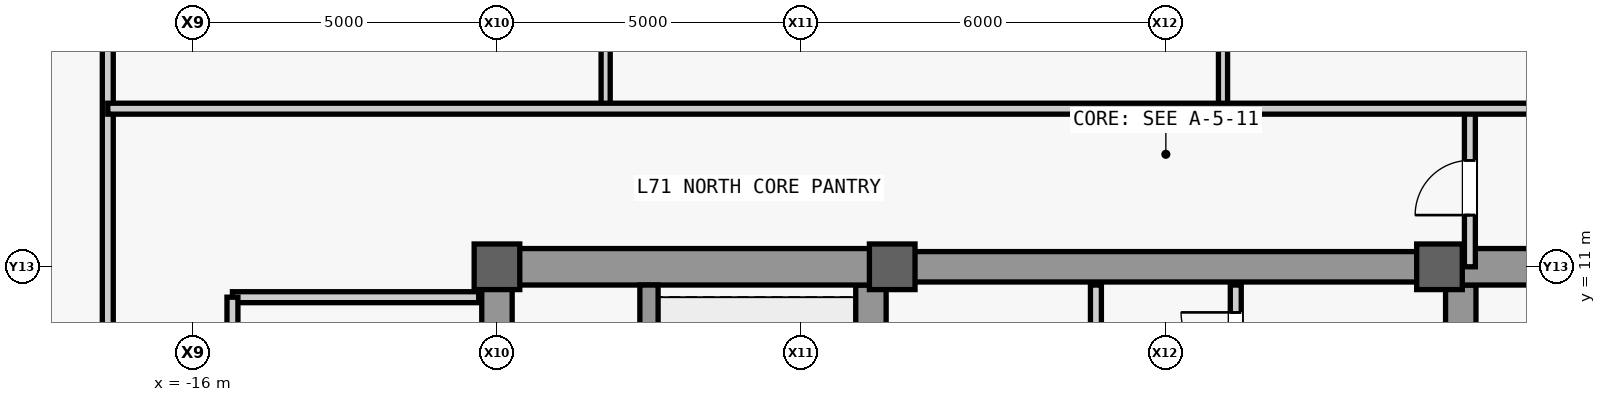
"""IFC4 building model, lengths in metres.
Left out: names, types, materials, properties, quantities, classifications, styles, units other than length and angle.
Written with IfcOpenShell. Run it as: python <this file> out.ifc"""

import sys

from ifc_helpers import new_model, si_unit, direction, frame, frame_2d, origin, origin_2d, place, context, subcontext, project, spatial, rectangle, extrude, source, transform, mapped, element, fill, save


model = new_model("IFC4")
c1 = context("Model", 3, precision=1e-05, world=origin(), true_north=direction((0.0, 1.0)))
c2 = subcontext(c1, "Body", "Model", "MODEL_VIEW")
j1 = project(units=[si_unit("LENGTHUNIT", "METRE"), si_unit("PLANEANGLEUNIT", "RADIAN")], contexts=[c1])
p1 = place(None, origin())
s1 = spatial("IfcSite", under=j1, at=p1, CompositionType="ELEMENT")
p2 = place(p1, origin())
s2 = spatial("IfcBuilding", under=s1, at=p2, CompositionType="ELEMENT")
p3 = place(p2, frame((0.0, 0.0, 301.5)))
s3 = spatial("IfcBuildingStorey", under=s2, at=p3, CompositionType="ELEMENT", Elevation=301.5)
m1 = source(origin(), c2, "Body", "SweptSolid", [
    extrude(rectangle(XDim=22.0, YDim=0.5, at=frame_2d((11.0, 0.0))), origin(), (0.0, 0.0, 1.0), 3.78),
])
p4 = place(p3, frame((-11.0, -11.0, 0.0), z_axis=(0.0, 0.0, 1.0), x_axis=(0.0, 1.0, 0.0)))
e1 = element("IfcWall", 1, at=p4, inside=s3, PredefinedType="SHEAR", context=c2, shape_type="MappedRepresentation", body=[
    mapped(m1, transform((0.0, 0.0, 0.0), scale=1.0)),
])
m2 = source(origin(), c2, "Body", "SweptSolid", [
    extrude(rectangle(XDim=1.1, YDim=2.2, at=frame_2d((0.55, 1.1))), frame((0.0, 0.26, 0.0), z_axis=(0.0, -1.0, 0.0), x_axis=(1.0, 0.0, 0.0)), (0.0, 0.0, 1.0), 0.52),
])
p5 = place(p4, frame((0.8, 0.0, 0.0)))
e2 = element("IfcOpeningElement", 2, at=p5, cuts=e1, PredefinedType="OPENING", context=c2, shape_type="MappedRepresentation", body=[
    mapped(m2, transform((0.0, 0.0, 0.0), scale=1.0)),
])
p6 = place(p4, frame((12.5, 0.0, 0.0)))
e3 = element("IfcOpeningElement", 3, at=p6, cuts=e1, PredefinedType="OPENING", context=c2, shape_type="MappedRepresentation", body=[
    mapped(m2, transform((0.0, 0.0, 0.0), scale=1.0)),
])
m3 = source(origin(), c2, "Body", "SweptSolid", [
    extrude(rectangle(XDim=0.9, YDim=2.15, at=frame_2d((0.45, 1.075))), frame((0.0, 0.26, 0.0), z_axis=(0.0, -1.0, 0.0), x_axis=(1.0, 0.0, 0.0)), (0.0, 0.0, 1.0), 0.52),
])
p7 = place(p4, frame((6.85, 0.0, 0.0)))
e4 = element("IfcOpeningElement", 4, at=p7, cuts=e1, PredefinedType="OPENING", context=c2, shape_type="MappedRepresentation", body=[
    mapped(m3, transform((0.0, 0.0, 0.0), scale=1.0)),
])
m4 = source(origin(), c2, "Body", "SweptSolid", [
    extrude(rectangle(XDim=1.2, YDim=2.3, at=frame_2d((0.6, 1.15))), frame((0.0, 0.26, 0.0), z_axis=(0.0, -1.0, 0.0), x_axis=(1.0, 0.0, 0.0)), (0.0, 0.0, 1.0), 0.52),
])
p8 = place(p4, frame((14.6, 0.0, 0.0)))
e5 = element("IfcOpeningElement", 5, at=p8, cuts=e1, PredefinedType="OPENING", context=c2, shape_type="MappedRepresentation", body=[
    mapped(m4, transform((0.0, 0.0, 0.0), scale=1.0)),
])
p9 = place(p4, frame((18.2, 0.0, 0.0)))
e6 = element("IfcOpeningElement", 6, at=p9, cuts=e1, PredefinedType="OPENING", context=c2, shape_type="MappedRepresentation", body=[
    mapped(m4, transform((0.0, 0.0, 0.0), scale=1.0)),
])
m5 = source(origin(), c2, "Body", "SweptSolid", [
    extrude(rectangle(XDim=1.3, YDim=2.3, at=frame_2d((0.65, 1.15))), frame((0.0, 0.26, 0.0), z_axis=(0.0, -1.0, 0.0), x_axis=(1.0, 0.0, 0.0)), (0.0, 0.0, 1.0), 0.52),
])
p10 = place(p4, frame((2.7, 0.0, 0.0)))
e7 = element("IfcOpeningElement", 7, at=p10, cuts=e1, PredefinedType="OPENING", context=c2, shape_type="MappedRepresentation", body=[
    mapped(m5, transform((0.0, 0.0, 0.0), scale=1.0)),
])
m6 = source(origin(), c2, "Body", "SweptSolid", [
    extrude(rectangle(XDim=21.4, YDim=0.5, at=frame_2d((10.7, 0.0))), origin(), (0.0, 0.0, 1.0), 3.78),
])
for number, where, z_axis, x_axis in (
    (8, (-4.85, -10.7, 0.0), (0.0, 0.0, 1.0), (0.0, 1.0, 0.0)),
    (9, (4.85, -10.7, 0.0), (0.0, 0.0, 1.0), (0.0, 1.0, 0.0)),
):
    element("IfcWall", number, at=place(p3, frame(where, z_axis=z_axis, x_axis=x_axis)), inside=s3, PredefinedType="SHEAR", context=c2, shape_type="MappedRepresentation", body=[
        mapped(m6, transform((0.0, 0.0, 0.0), scale=1.0)),
    ])
m7 = source(origin(), c2, "Body", "SweptSolid", [
    extrude(rectangle(XDim=5.9, YDim=0.6, at=frame_2d((2.95, 0.0))), origin(), (0.0, 0.0, 1.0), 3.78),
])
p11 = place(p3, frame((-10.75, 11.0, 0.0), z_axis=(0.0, 0.0, 1.0), x_axis=(1.0, 0.0, 0.0)))
e10 = element("IfcWall", 10, at=p11, inside=s3, PredefinedType="SHEAR", context=c2, shape_type="MappedRepresentation", body=[
    mapped(m7, transform((0.0, 0.0, 0.0), scale=1.0)),
])
p12 = place(p3, frame((4.85, 11.0, 0.0), z_axis=(0.0, 0.0, 1.0), x_axis=(1.0, 0.0, 0.0)))
e11 = element("IfcWall", 11, at=p12, inside=s3, PredefinedType="SHEAR", context=c2, shape_type="MappedRepresentation", body=[
    mapped(m7, transform((0.0, 0.0, 0.0), scale=1.0)),
])
m8 = source(origin(), c2, "Body", "SweptSolid", [
    extrude(rectangle(XDim=1.05, YDim=2.2, at=frame_2d((0.525, 1.1))), frame((0.0, 0.31, 0.0), z_axis=(0.0, -1.0, 0.0), x_axis=(1.0, 0.0, 0.0)), (0.0, 0.0, 1.0), 0.62),
])
p13 = place(p12, frame((1.375, 0.0, 0.0)))
e12 = element("IfcOpeningElement", 12, at=p13, cuts=e11, PredefinedType="OPENING", context=c2, shape_type="MappedRepresentation", body=[
    mapped(m8, transform((0.0, 0.0, 0.0), scale=1.0)),
])
m9 = source(origin(), c2, "Body", "SweptSolid", [
    extrude(rectangle(XDim=9.2, YDim=0.5, at=frame_2d((4.6, 0.0))), origin(), (0.0, 0.0, 1.0), 3.78),
])
p14 = place(p3, frame((-4.6, 11.0, 0.0), z_axis=(0.0, 0.0, 1.0), x_axis=(1.0, 0.0, 0.0)))
e13 = element("IfcWall", 13, at=p14, inside=s3, PredefinedType="SHEAR", context=c2, shape_type="MappedRepresentation", body=[
    mapped(m9, transform((0.0, 0.0, 0.0), scale=1.0)),
])
m10 = source(origin(), c2, "Body", "SweptSolid", [
    extrude(rectangle(XDim=0.75, YDim=0.75, at=origin_2d()), origin(), (0.0, 0.0, 1.0), 4.0),
])
for number, where, z_axis, x_axis in (
    (14, (-11.0, 11.0, 0.0), (0.0, 0.0, 1.0), (1.0, 0.0, 0.0)),
    (15, (-4.5, 11.0, 0.0), (0.0, 0.0, 1.0), (1.0, 0.0, 0.0)),
    (16, (4.5, 11.0, 0.0), (0.0, 0.0, 1.0), (1.0, 0.0, 0.0)),
):
    element("IfcColumn", number, at=place(p3, frame(where, z_axis=z_axis, x_axis=x_axis)), inside=s3, PredefinedType="COLUMN", context=c2, shape_type="MappedRepresentation", body=[
        mapped(m10, transform((0.0, 0.0, 0.0), scale=1.0)),
    ])
m11 = source(origin(), c2, "Body", "SweptSolid", [
    extrude(rectangle(XDim=7.75, YDim=0.3, at=frame_2d((3.875, 0.0))), origin(), (0.0, 0.0, 1.0), 3.78),
])
p15 = place(p3, frame((-8.5, 2.95, 0.0), z_axis=(0.0, 0.0, 1.0), x_axis=(0.0, 1.0, 0.0)))
e17 = element("IfcWall", 17, at=p15, inside=s3, PredefinedType="SHEAR", context=c2, shape_type="MappedRepresentation", body=[
    mapped(m11, transform((0.0, 0.0, 0.0), scale=1.0)),
])
m12 = source(origin(), c2, "Body", "SweptSolid", [
    extrude(rectangle(XDim=4.05, YDim=0.18, at=frame_2d((2.025, 0.0))), origin(), (0.0, 0.0, 1.0), 3.78),
])
p16 = place(p3, frame((-15.35, 10.5, 0.0), z_axis=(0.0, 0.0, 1.0), x_axis=(1.0, 0.0, 0.0)))
e18 = element("IfcWall", 18, at=p16, inside=s3, PredefinedType="PARTITIONING", context=c2, shape_type="MappedRepresentation", body=[
    mapped(m12, transform((0.0, 0.0, 0.0), scale=1.0)),
])
m13 = source(origin(), c2, "Body", "SweptSolid", [
    extrude(rectangle(XDim=16.6, YDim=0.18, at=frame_2d((8.3, 0.0))), origin(), (0.0, 0.0, 1.0), 3.78),
])
p17 = place(p3, frame((-15.35, -6.1, 0.0), z_axis=(0.0, 0.0, 1.0), x_axis=(0.0, 1.0, 0.0)))
e19 = element("IfcWall", 19, at=p17, inside=s3, PredefinedType="PARTITIONING", context=c2, shape_type="MappedRepresentation", body=[
    mapped(m13, transform((0.0, 0.0, 0.0), scale=1.0)),
])
m14 = source(origin(), c2, "Body", "SweptSolid", [
    extrude(rectangle(XDim=1.8, YDim=2.25, at=frame_2d((0.9, 1.125))), frame((0.0, 0.1, 0.0), z_axis=(0.0, -1.0, 0.0), x_axis=(1.0, 0.0, 0.0)), (0.0, 0.0, 1.0), 0.2),
])
p18 = place(p17, frame((2.7, 0.0, 0.0)))
e20 = element("IfcOpeningElement", 20, at=p18, cuts=e19, PredefinedType="OPENING", context=c2, shape_type="MappedRepresentation", body=[
    mapped(m14, transform((0.0, 0.0, 0.0), scale=1.0)),
])
p19 = place(p17, frame((11.0, 0.0, 0.0)))
e21 = element("IfcOpeningElement", 21, at=p19, cuts=e19, PredefinedType="OPENING", context=c2, shape_type="MappedRepresentation", body=[
    mapped(m14, transform((0.0, 0.0, 0.0), scale=1.0)),
])
m15 = source(origin(), c2, "Body", "SweptSolid", [
    extrude(rectangle(XDim=5.4, YDim=0.18, at=frame_2d((2.7, 0.0))), origin(), (0.0, 0.0, 1.0), 3.78),
])
p20 = place(p3, frame((-1.15, 5.3, 0.0), z_axis=(0.0, 0.0, 1.0), x_axis=(0.0, 1.0, 0.0)))
e22 = element("IfcWall", 22, at=p20, inside=s3, PredefinedType="PARTITIONING", context=c2, shape_type="MappedRepresentation", body=[
    mapped(m15, transform((0.0, 0.0, 0.0), scale=1.0)),
])
m16 = source(origin(), c2, "Body", "SweptSolid", [
    extrude(rectangle(XDim=0.9, YDim=2.15, at=frame_2d((0.45, 1.075))), frame((0.0, 0.1, 0.0), z_axis=(0.0, -1.0, 0.0), x_axis=(1.0, 0.0, 0.0)), (0.0, 0.0, 1.0), 0.2),
])
p21 = place(p20, frame((2.25, 0.0, 0.0)))
e23 = element("IfcOpeningElement", 23, at=p21, cuts=e22, PredefinedType="OPENING", context=c2, shape_type="MappedRepresentation", body=[
    mapped(m16, transform((0.0, 0.0, 0.0), scale=1.0)),
])
p22 = place(p3, frame((1.15, 5.3, 0.0), z_axis=(0.0, 0.0, 1.0), x_axis=(0.0, 1.0, 0.0)))
e24 = element("IfcWall", 24, at=p22, inside=s3, PredefinedType="PARTITIONING", context=c2, shape_type="MappedRepresentation", body=[
    mapped(m15, transform((0.0, 0.0, 0.0), scale=1.0)),
])
p23 = place(p22, frame((0.45, 0.0, 0.0)))
e25 = element("IfcOpeningElement", 25, at=p23, cuts=e24, PredefinedType="OPENING", context=c2, shape_type="MappedRepresentation", body=[
    mapped(m16, transform((0.0, 0.0, 0.0), scale=1.0)),
])
p24 = place(p22, frame((2.25, 0.0, 0.0)))
e26 = element("IfcOpeningElement", 26, at=p24, cuts=e24, PredefinedType="OPENING", context=c2, shape_type="MappedRepresentation", body=[
    mapped(m16, transform((0.0, 0.0, 0.0), scale=1.0)),
])
p25 = place(p22, frame((4.05, 0.0, 0.0)))
e27 = element("IfcOpeningElement", 27, at=p25, cuts=e24, PredefinedType="OPENING", context=c2, shape_type="MappedRepresentation", body=[
    mapped(m16, transform((0.0, 0.0, 0.0), scale=1.0)),
])
m17 = source(origin(), c2, "Body", "SweptSolid", [
    extrude(rectangle(XDim=8.4, YDim=0.18, at=frame_2d((4.2, 0.0))), origin(), (0.0, 0.0, 1.0), 3.78),
])
p26 = place(p3, frame((-17.4, 7.2, 0.0), z_axis=(0.0, 0.0, 1.0), x_axis=(0.0, 1.0, 0.0)))
e28 = element("IfcWall", 28, at=p26, inside=s3, PredefinedType="PARTITIONING", context=c2, shape_type="MappedRepresentation", body=[
    mapped(m17, transform((0.0, 0.0, 0.0), scale=1.0)),
])
m18 = source(origin(), c2, "Body", "SweptSolid", [
    extrude(rectangle(XDim=2.6, YDim=0.18, at=frame_2d((1.3, 0.0))), origin(), (0.0, 0.0, 1.0), 3.78),
])
p27 = place(p3, frame((5.0, 11.0, 0.0), z_axis=(0.0, 0.0, 1.0), x_axis=(0.0, 1.0, 0.0)))
e29 = element("IfcWall", 29, at=p27, inside=s3, PredefinedType="PARTITIONING", context=c2, shape_type="MappedRepresentation", body=[
    mapped(m18, transform((0.0, 0.0, 0.0), scale=1.0)),
])
p28 = place(p27, frame((0.85, 0.0, 0.0)))
e30 = element("IfcOpeningElement", 30, at=p28, cuts=e29, PredefinedType="OPENING", context=c2, shape_type="MappedRepresentation", body=[
    mapped(m16, transform((0.0, 0.0, 0.0), scale=1.0)),
])
m19 = source(origin(), c2, "Body", "SweptSolid", [
    extrude(rectangle(XDim=14.4, YDim=0.15, at=frame_2d((7.2, 0.0))), origin(), (0.0, 0.0, 1.0), 3.78),
])
p29 = place(p3, frame((-9.212, 13.6, 0.0), z_axis=(0.0, 0.0, 1.0), x_axis=(0.0, 1.0, 0.0)))
e31 = element("IfcWall", 31, at=p29, inside=s3, PredefinedType="PARTITIONING", context=c2, shape_type="MappedRepresentation", body=[
    mapped(m19, transform((0.0, 0.0, 0.0), scale=1.0)),
])
m20 = source(origin(), c2, "Body", "SweptSolid", [
    extrude(rectangle(XDim=0.95, YDim=2.15, at=frame_2d((0.475, 1.075))), frame((0.0, 0.085, 0.0), z_axis=(0.0, -1.0, 0.0), x_axis=(1.0, 0.0, 0.0)), (0.0, 0.0, 1.0), 0.17),
])
p30 = place(p29, frame((2.981, 0.0, 0.0)))
e32 = element("IfcOpeningElement", 32, at=p30, cuts=e31, PredefinedType="OPENING", context=c2, shape_type="MappedRepresentation", body=[
    mapped(m20, transform((0.0, 0.0, 0.0), scale=1.0)),
])
p31 = place(p3, frame((0.94, 13.6, 0.0), z_axis=(0.0, 0.0, 1.0), x_axis=(0.0, 1.0, 0.0)))
e33 = element("IfcWall", 33, at=p31, inside=s3, PredefinedType="PARTITIONING", context=c2, shape_type="MappedRepresentation", body=[
    mapped(m19, transform((0.0, 0.0, 0.0), scale=1.0)),
])
p32 = place(p31, frame((2.981, 0.0, 0.0)))
e34 = element("IfcOpeningElement", 34, at=p32, cuts=e33, PredefinedType="OPENING", context=c2, shape_type="MappedRepresentation", body=[
    mapped(m20, transform((0.0, 0.0, 0.0), scale=1.0)),
])
m21 = source(origin(), c2, "Body", "SweptSolid", [
    extrude(rectangle(XDim=32.75, YDim=0.18, at=frame_2d((16.375, 0.0))), origin(), (0.0, 0.0, 1.0), 3.78),
])
p33 = place(p3, frame((-17.4, 13.6, 0.0), z_axis=(0.0, 0.0, 1.0), x_axis=(1.0, 0.0, 0.0)))
e35 = element("IfcWall", 35, at=p33, inside=s3, PredefinedType="PARTITIONING", context=c2, shape_type="MappedRepresentation", body=[
    mapped(m21, transform((0.0, 0.0, 0.0), scale=1.0)),
])
m22 = source(origin(), c2, "Body", "SweptSolid", [
    extrude(rectangle(XDim=1.05, YDim=2.2, at=frame_2d((0.525, 1.1))), frame((0.0, 0.1, 0.0), z_axis=(0.0, -1.0, 0.0), x_axis=(1.0, 0.0, 0.0)), (0.0, 0.0, 1.0), 0.2),
])
p34 = place(p33, frame((24.603, 0.0, 0.0)))
e36 = element("IfcOpeningElement", 36, at=p34, cuts=e35, PredefinedType="OPENING", context=c2, shape_type="MappedRepresentation", body=[
    mapped(m22, transform((0.0, 0.0, 0.0), scale=1.0)),
])
p35 = place(p33, frame((28.802, 0.0, 0.0)))
e37 = element("IfcOpeningElement", 37, at=p35, cuts=e35, PredefinedType="OPENING", context=c2, shape_type="MappedRepresentation", body=[
    mapped(m22, transform((0.0, 0.0, 0.0), scale=1.0)),
])
m23 = source(origin(), c2, "Body", "SweptSolid", [
    extrude(rectangle(XDim=0.9, YDim=2.15, at=frame_2d((0.45, 1.075))), frame((0.0, 0.025, 0.0), z_axis=(0.0, -1.0, 0.0), x_axis=(1.0, 0.0, 0.0)), (0.0, 0.0, 1.0), 0.05),
])
p36 = place(p25, origin())
e38 = element("IfcDoor", 38, at=p36, inside=s3, OperationType="SINGLE_SWING_RIGHT", PredefinedType="DOOR", context=c2, shape_type="MappedRepresentation", body=[
    mapped(m23, transform((0.0, 0.0, 0.0), scale=1.0)),
])
fill(e27, e38)
p37 = place(p28, origin())
e39 = element("IfcDoor", 39, at=p37, inside=s3, OperationType="SINGLE_SWING_LEFT", PredefinedType="DOOR", context=c2, shape_type="MappedRepresentation", body=[
    mapped(m23, transform((0.0, 0.0, 0.0), scale=1.0)),
])
fill(e30, e39)
save(model, sys.argv[1])
